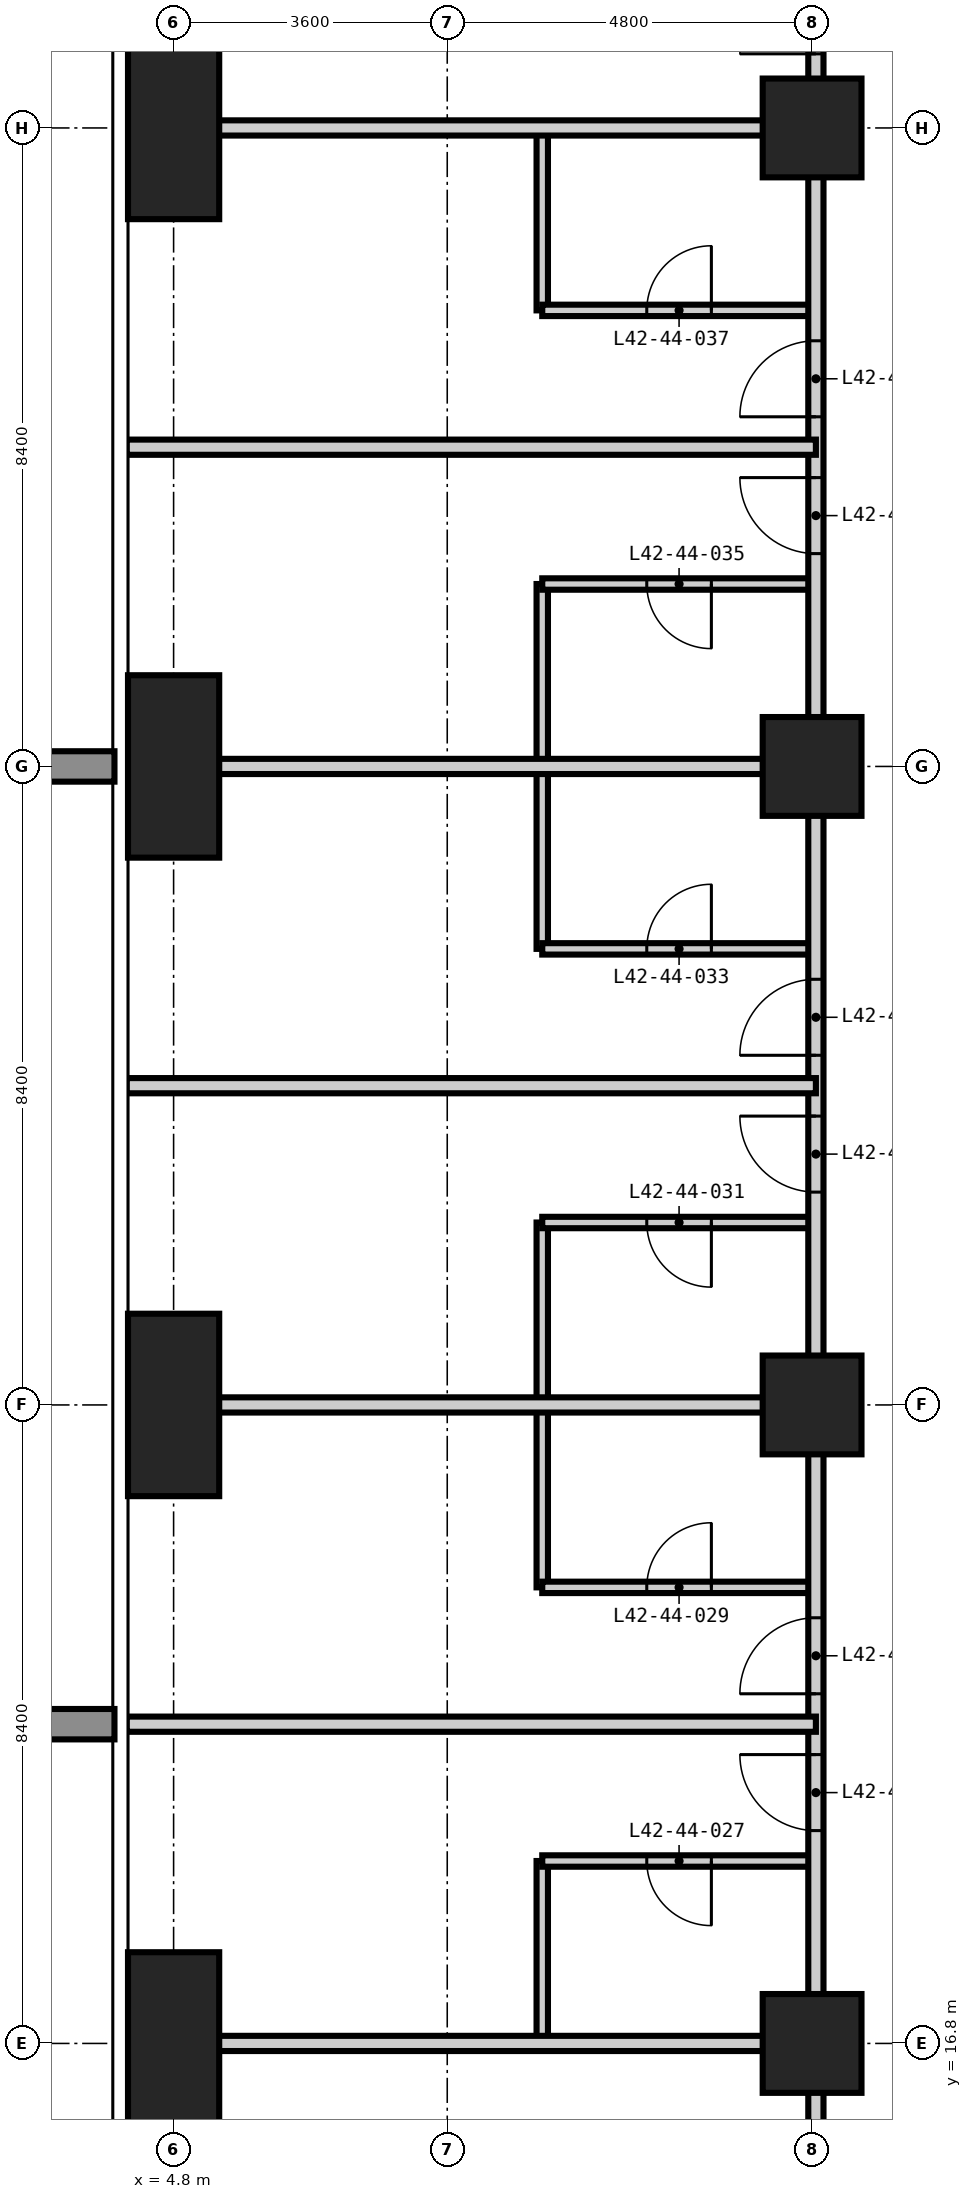
"""IFC4 building model, lengths in metres.
Left out: names, types, materials, properties, quantities, classifications, styles, units other than length and angle.
Written with IfcOpenShell. Run it as: python <this file> out.ifc"""

import sys

from ifc_helpers import new_model, si_unit, direction, frame, frame_2d, origin, origin_2d, place, context, subcontext, project, spatial, rectangle, extrude, element, fill, save


model = new_model("IFC4")
c1 = context("Model", 3, precision=1e-05, world=origin(), true_north=direction((0.0, 1.0)))
c2 = subcontext(c1, "Body", "Model", "MODEL_VIEW")
j1 = project(units=[si_unit("LENGTHUNIT", "METRE"), si_unit("PLANEANGLEUNIT", "RADIAN")], contexts=[c1])
p1 = place(None, origin())
s1 = spatial("IfcSite", under=j1, at=p1, CompositionType="ELEMENT")
p2 = place(p1, origin())
s2 = spatial("IfcBuilding", under=s1, at=p2, CompositionType="ELEMENT")
p3 = place(p2, frame((0.0, 0.0, 166.2)))
s3 = spatial("IfcBuildingStorey", under=s2, at=p3, CompositionType="ELEMENT", Elevation=166.2)
for number, where, z_axis, x_axis in (
    (1, (4.8, 16.8, -0.35), (0.0, 0.0, 1.0), (1.0, 0.0, 0.0)),
    (2, (4.8, 25.2, -0.35), (0.0, 0.0, 1.0), (1.0, 0.0, 0.0)),
    (3, (4.8, 33.6, -0.35), (0.0, 0.0, 1.0), (1.0, 0.0, 0.0)),
    (4, (4.8, 42.0, -0.35), (0.0, 0.0, 1.0), (1.0, 0.0, 0.0)),
):
    element("IfcColumn", number, at=place(p3, frame(where, z_axis=z_axis, x_axis=x_axis)), inside=s3, PredefinedType="COLUMN", context=c2, shape_type="SweptSolid", body=[
        extrude(rectangle(XDim=1.2, YDim=2.4, at=origin_2d()), origin(), (0.0, 0.0, 1.0), 3.6),
    ])
for number, where, z_axis, x_axis in (
    (5, (13.2, 16.8, -0.35), (0.0, 0.0, 1.0), (1.0, 0.0, 0.0)),
    (6, (13.2, 25.2, -0.35), (0.0, 0.0, 1.0), (1.0, 0.0, 0.0)),
    (7, (13.2, 33.6, -0.35), (0.0, 0.0, 1.0), (1.0, 0.0, 0.0)),
    (8, (13.2, 42.0, -0.35), (0.0, 0.0, 1.0), (1.0, 0.0, 0.0)),
):
    element("IfcColumn", number, at=place(p3, frame(where, z_axis=z_axis, x_axis=x_axis)), inside=s3, PredefinedType="COLUMN", context=c2, shape_type="SweptSolid", body=[
        extrude(rectangle(XDim=1.3, YDim=1.3, at=origin_2d()), origin(), (0.0, 0.0, 1.0), 3.6),
    ])
p4 = place(p3, frame((9.65, 16.8, 0.0), z_axis=(0.0, 0.0, 1.0), x_axis=(0.0, 1.0, 0.0)))
e9 = element("IfcWall", 9, at=p4, inside=s3, PredefinedType="PARTITIONING", context=c2, shape_type="SweptSolid", body=[
    extrude(rectangle(XDim=2.4, YDim=0.15, at=frame_2d((1.2, 0.0))), origin(), (0.0, 0.0, 1.0), 3.25),
])
for number, where, z_axis, x_axis in (
    (10, (9.65, 22.8, 0.0), (0.0, 0.0, 1.0), (0.0, 1.0, 0.0)),
    (11, (9.65, 31.2, 0.0), (0.0, 0.0, 1.0), (0.0, 1.0, 0.0)),
):
    element("IfcWall", number, at=place(p3, frame(where, z_axis=z_axis, x_axis=x_axis)), inside=s3, PredefinedType="PARTITIONING", context=c2, shape_type="SweptSolid", body=[
        extrude(rectangle(XDim=4.8, YDim=0.15, at=frame_2d((2.4, 0.0))), origin(), (0.0, 0.0, 1.0), 3.25),
    ])
p5 = place(p3, frame((9.65, 39.6, 0.0), z_axis=(0.0, 0.0, 1.0), x_axis=(0.0, 1.0, 0.0)))
e12 = element("IfcWall", 12, at=p5, inside=s3, PredefinedType="PARTITIONING", context=c2, shape_type="SweptSolid", body=[
    extrude(rectangle(XDim=2.4, YDim=0.15, at=frame_2d((1.2, 0.0))), origin(), (0.0, 0.0, 1.0), 3.25),
])
p6 = place(p3, frame((9.65, 19.2, 0.0), z_axis=(0.0, 0.0, 1.0), x_axis=(1.0, 0.0, 0.0)))
e13 = element("IfcWall", 13, at=p6, inside=s3, PredefinedType="PARTITIONING", context=c2, shape_type="SweptSolid", body=[
    extrude(rectangle(XDim=3.6, YDim=0.15, at=frame_2d((1.8, 0.0))), origin(), (0.0, 0.0, 1.0), 3.25),
])
p7 = place(p6, frame((1.375, 0.0, 0.0)))
e14 = element("IfcOpeningElement", 14, at=p7, cuts=e13, PredefinedType="OPENING", context=c2, shape_type="SweptSolid", body=[
    extrude(rectangle(XDim=0.85, YDim=2.1, at=frame_2d((0.425, 1.05))), frame((0.0, 0.085, 0.0), z_axis=(0.0, -1.0, 0.0), x_axis=(1.0, 0.0, 0.0)), (0.0, 0.0, 1.0), 0.17),
])
p8 = place(p3, frame((9.65, 22.8, 0.0), z_axis=(0.0, 0.0, 1.0), x_axis=(1.0, 0.0, 0.0)))
e15 = element("IfcWall", 15, at=p8, inside=s3, PredefinedType="PARTITIONING", context=c2, shape_type="SweptSolid", body=[
    extrude(rectangle(XDim=3.6, YDim=0.15, at=frame_2d((1.8, 0.0))), origin(), (0.0, 0.0, 1.0), 3.25),
])
p9 = place(p8, frame((1.375, 0.0, 0.0)))
e16 = element("IfcOpeningElement", 16, at=p9, cuts=e15, PredefinedType="OPENING", context=c2, shape_type="SweptSolid", body=[
    extrude(rectangle(XDim=0.85, YDim=2.1, at=frame_2d((0.425, 1.05))), frame((0.0, 0.085, 0.0), z_axis=(0.0, -1.0, 0.0), x_axis=(1.0, 0.0, 0.0)), (0.0, 0.0, 1.0), 0.17),
])
p10 = place(p3, frame((9.65, 27.6, 0.0), z_axis=(0.0, 0.0, 1.0), x_axis=(1.0, 0.0, 0.0)))
e17 = element("IfcWall", 17, at=p10, inside=s3, PredefinedType="PARTITIONING", context=c2, shape_type="SweptSolid", body=[
    extrude(rectangle(XDim=3.6, YDim=0.15, at=frame_2d((1.8, 0.0))), origin(), (0.0, 0.0, 1.0), 3.25),
])
p11 = place(p10, frame((1.375, 0.0, 0.0)))
e18 = element("IfcOpeningElement", 18, at=p11, cuts=e17, PredefinedType="OPENING", context=c2, shape_type="SweptSolid", body=[
    extrude(rectangle(XDim=0.85, YDim=2.1, at=frame_2d((0.425, 1.05))), frame((0.0, 0.085, 0.0), z_axis=(0.0, -1.0, 0.0), x_axis=(1.0, 0.0, 0.0)), (0.0, 0.0, 1.0), 0.17),
])
p12 = place(p3, frame((9.65, 31.2, 0.0), z_axis=(0.0, 0.0, 1.0), x_axis=(1.0, 0.0, 0.0)))
e19 = element("IfcWall", 19, at=p12, inside=s3, PredefinedType="PARTITIONING", context=c2, shape_type="SweptSolid", body=[
    extrude(rectangle(XDim=3.6, YDim=0.15, at=frame_2d((1.8, 0.0))), origin(), (0.0, 0.0, 1.0), 3.25),
])
p13 = place(p12, frame((1.375, 0.0, 0.0)))
e20 = element("IfcOpeningElement", 20, at=p13, cuts=e19, PredefinedType="OPENING", context=c2, shape_type="SweptSolid", body=[
    extrude(rectangle(XDim=0.85, YDim=2.1, at=frame_2d((0.425, 1.05))), frame((0.0, 0.085, 0.0), z_axis=(0.0, -1.0, 0.0), x_axis=(1.0, 0.0, 0.0)), (0.0, 0.0, 1.0), 0.17),
])
p14 = place(p3, frame((9.65, 36.0, 0.0), z_axis=(0.0, 0.0, 1.0), x_axis=(1.0, 0.0, 0.0)))
e21 = element("IfcWall", 21, at=p14, inside=s3, PredefinedType="PARTITIONING", context=c2, shape_type="SweptSolid", body=[
    extrude(rectangle(XDim=3.6, YDim=0.15, at=frame_2d((1.8, 0.0))), origin(), (0.0, 0.0, 1.0), 3.25),
])
p15 = place(p14, frame((1.375, 0.0, 0.0)))
e22 = element("IfcOpeningElement", 22, at=p15, cuts=e21, PredefinedType="OPENING", context=c2, shape_type="SweptSolid", body=[
    extrude(rectangle(XDim=0.85, YDim=2.1, at=frame_2d((0.425, 1.05))), frame((0.0, 0.085, 0.0), z_axis=(0.0, -1.0, 0.0), x_axis=(1.0, 0.0, 0.0)), (0.0, 0.0, 1.0), 0.17),
])
p16 = place(p3, frame((9.65, 39.6, 0.0), z_axis=(0.0, 0.0, 1.0), x_axis=(1.0, 0.0, 0.0)))
e23 = element("IfcWall", 23, at=p16, inside=s3, PredefinedType="PARTITIONING", context=c2, shape_type="SweptSolid", body=[
    extrude(rectangle(XDim=3.6, YDim=0.15, at=frame_2d((1.8, 0.0))), origin(), (0.0, 0.0, 1.0), 3.25),
])
p17 = place(p16, frame((1.375, 0.0, 0.0)))
e24 = element("IfcOpeningElement", 24, at=p17, cuts=e23, PredefinedType="OPENING", context=c2, shape_type="SweptSolid", body=[
    extrude(rectangle(XDim=0.85, YDim=2.1, at=frame_2d((0.425, 1.05))), frame((0.0, 0.085, 0.0), z_axis=(0.0, -1.0, 0.0), x_axis=(1.0, 0.0, 0.0)), (0.0, 0.0, 1.0), 0.17),
])
p18 = place(p3, frame((13.25, 13.25, 0.0), z_axis=(0.0, 0.0, 1.0), x_axis=(0.0, 1.0, 0.0)))
e25 = element("IfcWall", 25, at=p18, inside=s3, PredefinedType="PARTITIONING", context=c2, shape_type="SweptSolid", body=[
    extrude(rectangle(XDim=31.7, YDim=0.2, at=frame_2d((15.85, 0.0))), origin(), (0.0, 0.0, 1.0), 3.25),
])
p19 = place(p18, frame((6.35, 0.0, 0.0)))
e26 = element("IfcOpeningElement", 26, at=p19, cuts=e25, PredefinedType="OPENING", context=c2, shape_type="SweptSolid", body=[
    extrude(rectangle(XDim=1.0, YDim=2.2, at=frame_2d((0.5, 1.1))), frame((0.0, 0.11, 0.0), z_axis=(0.0, -1.0, 0.0), x_axis=(1.0, 0.0, 0.0)), (0.0, 0.0, 1.0), 0.22),
])
p20 = place(p18, frame((8.15, 0.0, 0.0)))
e27 = element("IfcOpeningElement", 27, at=p20, cuts=e25, PredefinedType="OPENING", context=c2, shape_type="SweptSolid", body=[
    extrude(rectangle(XDim=1.0, YDim=2.2, at=frame_2d((0.5, 1.1))), frame((0.0, 0.11, 0.0), z_axis=(0.0, -1.0, 0.0), x_axis=(1.0, 0.0, 0.0)), (0.0, 0.0, 1.0), 0.22),
])
p21 = place(p18, frame((14.75, 0.0, 0.0)))
e28 = element("IfcOpeningElement", 28, at=p21, cuts=e25, PredefinedType="OPENING", context=c2, shape_type="SweptSolid", body=[
    extrude(rectangle(XDim=1.0, YDim=2.2, at=frame_2d((0.5, 1.1))), frame((0.0, 0.11, 0.0), z_axis=(0.0, -1.0, 0.0), x_axis=(1.0, 0.0, 0.0)), (0.0, 0.0, 1.0), 0.22),
])
p22 = place(p18, frame((16.55, 0.0, 0.0)))
e29 = element("IfcOpeningElement", 29, at=p22, cuts=e25, PredefinedType="OPENING", context=c2, shape_type="SweptSolid", body=[
    extrude(rectangle(XDim=1.0, YDim=2.2, at=frame_2d((0.5, 1.1))), frame((0.0, 0.11, 0.0), z_axis=(0.0, -1.0, 0.0), x_axis=(1.0, 0.0, 0.0)), (0.0, 0.0, 1.0), 0.22),
])
p23 = place(p18, frame((23.15, 0.0, 0.0)))
e30 = element("IfcOpeningElement", 30, at=p23, cuts=e25, PredefinedType="OPENING", context=c2, shape_type="SweptSolid", body=[
    extrude(rectangle(XDim=1.0, YDim=2.2, at=frame_2d((0.5, 1.1))), frame((0.0, 0.11, 0.0), z_axis=(0.0, -1.0, 0.0), x_axis=(1.0, 0.0, 0.0)), (0.0, 0.0, 1.0), 0.22),
])
p24 = place(p18, frame((24.95, 0.0, 0.0)))
e31 = element("IfcOpeningElement", 31, at=p24, cuts=e25, PredefinedType="OPENING", context=c2, shape_type="SweptSolid", body=[
    extrude(rectangle(XDim=1.0, YDim=2.2, at=frame_2d((0.5, 1.1))), frame((0.0, 0.11, 0.0), z_axis=(0.0, -1.0, 0.0), x_axis=(1.0, 0.0, 0.0)), (0.0, 0.0, 1.0), 0.22),
])
p25 = place(p18, frame((1.275, 0.0, 0.0)))
e32 = element("IfcOpeningElement", 32, at=p25, cuts=e25, PredefinedType="OPENING", context=c2, shape_type="SweptSolid", body=[
    extrude(rectangle(XDim=1.0, YDim=2.2, at=frame_2d((0.5, 1.1))), frame((0.0, 0.11, 0.0), z_axis=(0.0, -1.0, 0.0), x_axis=(1.0, 0.0, 0.0)), (0.0, 0.0, 1.0), 0.22),
])
p26 = place(p18, frame((29.725, 0.0, 0.0)))
e33 = element("IfcOpeningElement", 33, at=p26, cuts=e25, PredefinedType="OPENING", context=c2, shape_type="SweptSolid", body=[
    extrude(rectangle(XDim=1.0, YDim=2.2, at=frame_2d((0.5, 1.1))), frame((0.0, 0.11, 0.0), z_axis=(0.0, -1.0, 0.0), x_axis=(1.0, 0.0, 0.0)), (0.0, 0.0, 1.0), 0.22),
])
for number, where, z_axis, x_axis in (
    (34, (4.182, 16.8, 0.0), (0.0, 0.0, 1.0), (1.0, 0.0, 0.0)),
    (35, (4.182, 21.0, 0.0), (0.0, 0.0, 1.0), (1.0, 0.0, 0.0)),
    (36, (4.182, 25.2, 0.0), (0.0, 0.0, 1.0), (1.0, 0.0, 0.0)),
    (37, (4.182, 29.4, 0.0), (0.0, 0.0, 1.0), (1.0, 0.0, 0.0)),
    (38, (4.182, 33.6, 0.0), (0.0, 0.0, 1.0), (1.0, 0.0, 0.0)),
    (39, (4.182, 37.8, 0.0), (0.0, 0.0, 1.0), (1.0, 0.0, 0.0)),
    (40, (4.182, 42.0, 0.0), (0.0, 0.0, 1.0), (1.0, 0.0, 0.0)),
):
    element("IfcWall", number, at=place(p3, frame(where, z_axis=z_axis, x_axis=x_axis)), inside=s3, PredefinedType="PARTITIONING", context=c2, shape_type="SweptSolid", body=[
        extrude(rectangle(XDim=9.068, YDim=0.2, at=frame_2d((4.534, 0.0))), origin(), (0.0, 0.0, 1.0), 3.25),
    ])
p27 = place(p19, origin())
e41 = element("IfcDoor", 41, at=p27, inside=s3, OperationType="SINGLE_SWING_RIGHT", PredefinedType="DOOR", context=c2, shape_type="SweptSolid", body=[
    extrude(rectangle(XDim=1.0, YDim=2.2, at=frame_2d((0.5, 1.1))), frame((0.0, 0.025, 0.0), z_axis=(0.0, -1.0, 0.0), x_axis=(1.0, 0.0, 0.0)), (0.0, 0.0, 1.0), 0.05),
])
fill(e26, e41)
p28 = place(p7, frame((0.85, 0.0, 0.0), z_axis=(0.0, 0.0, 1.0), x_axis=(-1.0, 0.0, 0.0)))
e42 = element("IfcDoor", 42, at=p28, inside=s3, OperationType="SINGLE_SWING_LEFT", PredefinedType="DOOR", context=c2, shape_type="SweptSolid", body=[
    extrude(rectangle(XDim=0.85, YDim=2.1, at=frame_2d((0.425, 1.05))), frame((0.0, 0.025, 0.0), z_axis=(0.0, -1.0, 0.0), x_axis=(1.0, 0.0, 0.0)), (0.0, 0.0, 1.0), 0.05),
])
fill(e14, e42)
p29 = place(p20, origin())
e43 = element("IfcDoor", 43, at=p29, inside=s3, OperationType="SINGLE_SWING_LEFT", PredefinedType="DOOR", context=c2, shape_type="SweptSolid", body=[
    extrude(rectangle(XDim=1.0, YDim=2.2, at=frame_2d((0.5, 1.1))), frame((0.0, 0.025, 0.0), z_axis=(0.0, -1.0, 0.0), x_axis=(1.0, 0.0, 0.0)), (0.0, 0.0, 1.0), 0.05),
])
fill(e27, e43)
p30 = place(p9, origin())
e44 = element("IfcDoor", 44, at=p30, inside=s3, OperationType="SINGLE_SWING_RIGHT", PredefinedType="DOOR", context=c2, shape_type="SweptSolid", body=[
    extrude(rectangle(XDim=0.85, YDim=2.1, at=frame_2d((0.425, 1.05))), frame((0.0, 0.025, 0.0), z_axis=(0.0, -1.0, 0.0), x_axis=(1.0, 0.0, 0.0)), (0.0, 0.0, 1.0), 0.05),
])
fill(e16, e44)
p31 = place(p21, origin())
e45 = element("IfcDoor", 45, at=p31, inside=s3, OperationType="SINGLE_SWING_RIGHT", PredefinedType="DOOR", context=c2, shape_type="SweptSolid", body=[
    extrude(rectangle(XDim=1.0, YDim=2.2, at=frame_2d((0.5, 1.1))), frame((0.0, 0.025, 0.0), z_axis=(0.0, -1.0, 0.0), x_axis=(1.0, 0.0, 0.0)), (0.0, 0.0, 1.0), 0.05),
])
fill(e28, e45)
p32 = place(p11, frame((0.85, 0.0, 0.0), z_axis=(0.0, 0.0, 1.0), x_axis=(-1.0, 0.0, 0.0)))
e46 = element("IfcDoor", 46, at=p32, inside=s3, OperationType="SINGLE_SWING_LEFT", PredefinedType="DOOR", context=c2, shape_type="SweptSolid", body=[
    extrude(rectangle(XDim=0.85, YDim=2.1, at=frame_2d((0.425, 1.05))), frame((0.0, 0.025, 0.0), z_axis=(0.0, -1.0, 0.0), x_axis=(1.0, 0.0, 0.0)), (0.0, 0.0, 1.0), 0.05),
])
fill(e18, e46)
p33 = place(p22, origin())
e47 = element("IfcDoor", 47, at=p33, inside=s3, OperationType="SINGLE_SWING_LEFT", PredefinedType="DOOR", context=c2, shape_type="SweptSolid", body=[
    extrude(rectangle(XDim=1.0, YDim=2.2, at=frame_2d((0.5, 1.1))), frame((0.0, 0.025, 0.0), z_axis=(0.0, -1.0, 0.0), x_axis=(1.0, 0.0, 0.0)), (0.0, 0.0, 1.0), 0.05),
])
fill(e29, e47)
p34 = place(p13, origin())
e48 = element("IfcDoor", 48, at=p34, inside=s3, OperationType="SINGLE_SWING_RIGHT", PredefinedType="DOOR", context=c2, shape_type="SweptSolid", body=[
    extrude(rectangle(XDim=0.85, YDim=2.1, at=frame_2d((0.425, 1.05))), frame((0.0, 0.025, 0.0), z_axis=(0.0, -1.0, 0.0), x_axis=(1.0, 0.0, 0.0)), (0.0, 0.0, 1.0), 0.05),
])
fill(e20, e48)
p35 = place(p23, origin())
e49 = element("IfcDoor", 49, at=p35, inside=s3, OperationType="SINGLE_SWING_RIGHT", PredefinedType="DOOR", context=c2, shape_type="SweptSolid", body=[
    extrude(rectangle(XDim=1.0, YDim=2.2, at=frame_2d((0.5, 1.1))), frame((0.0, 0.025, 0.0), z_axis=(0.0, -1.0, 0.0), x_axis=(1.0, 0.0, 0.0)), (0.0, 0.0, 1.0), 0.05),
])
fill(e30, e49)
p36 = place(p15, frame((0.85, 0.0, 0.0), z_axis=(0.0, 0.0, 1.0), x_axis=(-1.0, 0.0, 0.0)))
e50 = element("IfcDoor", 50, at=p36, inside=s3, OperationType="SINGLE_SWING_LEFT", PredefinedType="DOOR", context=c2, shape_type="SweptSolid", body=[
    extrude(rectangle(XDim=0.85, YDim=2.1, at=frame_2d((0.425, 1.05))), frame((0.0, 0.025, 0.0), z_axis=(0.0, -1.0, 0.0), x_axis=(1.0, 0.0, 0.0)), (0.0, 0.0, 1.0), 0.05),
])
fill(e22, e50)
p37 = place(p24, origin())
e51 = element("IfcDoor", 51, at=p37, inside=s3, OperationType="SINGLE_SWING_LEFT", PredefinedType="DOOR", context=c2, shape_type="SweptSolid", body=[
    extrude(rectangle(XDim=1.0, YDim=2.2, at=frame_2d((0.5, 1.1))), frame((0.0, 0.025, 0.0), z_axis=(0.0, -1.0, 0.0), x_axis=(1.0, 0.0, 0.0)), (0.0, 0.0, 1.0), 0.05),
])
fill(e31, e51)
p38 = place(p17, origin())
e52 = element("IfcDoor", 52, at=p38, inside=s3, OperationType="SINGLE_SWING_RIGHT", PredefinedType="DOOR", context=c2, shape_type="SweptSolid", body=[
    extrude(rectangle(XDim=0.85, YDim=2.1, at=frame_2d((0.425, 1.05))), frame((0.0, 0.025, 0.0), z_axis=(0.0, -1.0, 0.0), x_axis=(1.0, 0.0, 0.0)), (0.0, 0.0, 1.0), 0.05),
])
fill(e24, e52)
p39 = place(p26, origin())
e53 = element("IfcDoor", 53, at=p39, inside=s3, OperationType="SINGLE_SWING_LEFT", PredefinedType="DOOR", context=c2, shape_type="SweptSolid", body=[
    extrude(rectangle(XDim=1.0, YDim=2.2, at=frame_2d((0.5, 1.1))), frame((0.0, 0.025, 0.0), z_axis=(0.0, -1.0, 0.0), x_axis=(1.0, 0.0, 0.0)), (0.0, 0.0, 1.0), 0.05),
])
fill(e33, e53)
save(model, sys.argv[1])
